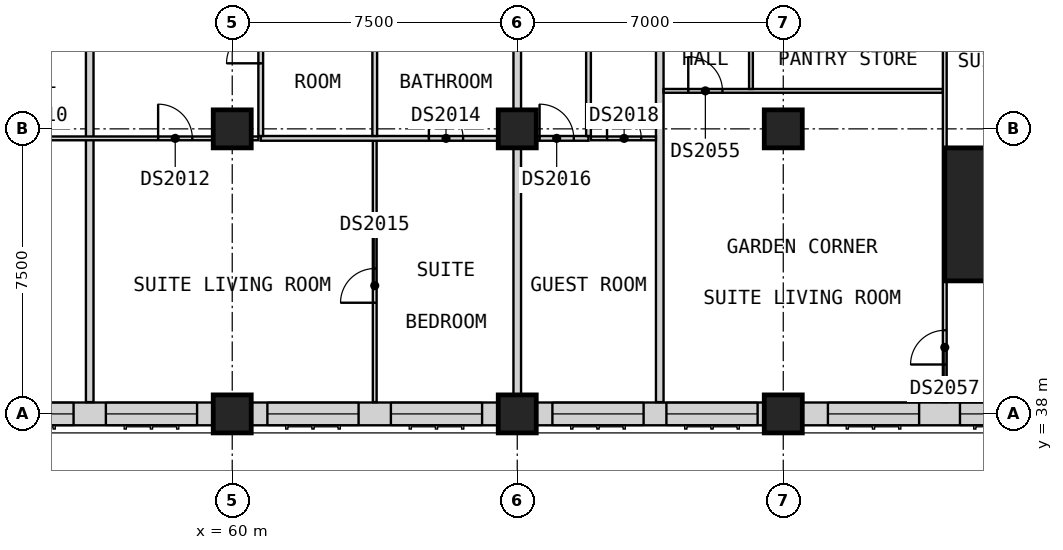
"""IFC4 building model, lengths in metres.
Left out: names, types, materials, properties, quantities, classifications, styles, units other than length and angle.
Written with IfcOpenShell. Run it as: python <this file> out.ifc"""

import sys

from ifc_helpers import new_model, si_unit, direction, frame, frame_2d, origin, origin_2d, place, context, subcontext, project, spatial, rectangle, extrude, element, fill, save


model = new_model("IFC4")
c1 = context("Model", 3, precision=1e-05, world=origin(), true_north=direction((0.0, 1.0)))
c2 = subcontext(c1, "Body", "Model", "MODEL_VIEW")
j1 = project(units=[si_unit("LENGTHUNIT", "METRE"), si_unit("PLANEANGLEUNIT", "RADIAN")], contexts=[c1])
p1 = place(None, origin())
s1 = spatial("IfcSite", under=j1, at=p1, CompositionType="ELEMENT")
p2 = place(p1, origin())
s2 = spatial("IfcBuilding", under=s1, at=p2, CompositionType="ELEMENT")
p3 = place(p2, frame((0.0, 0.0, 133.8)))
s3 = spatial("IfcBuildingStorey", under=s2, at=p3, CompositionType="ELEMENT", Elevation=133.8)
for number, where, z_axis, x_axis in (
    (1, (60.0, 38.0, 0.0), (0.0, 0.0, 1.0), (1.0, 0.0, 0.0)),
    (2, (60.0, 45.5, 0.0), (0.0, 0.0, 1.0), (1.0, 0.0, 0.0)),
    (3, (67.5, 38.0, 0.0), (0.0, 0.0, 1.0), (1.0, 0.0, 0.0)),
    (4, (67.5, 45.5, 0.0), (0.0, 0.0, 1.0), (1.0, 0.0, 0.0)),
    (5, (74.5, 38.0, 0.0), (0.0, 0.0, 1.0), (1.0, 0.0, 0.0)),
    (6, (74.5, 45.5, 0.0), (0.0, 0.0, 1.0), (1.0, 0.0, 0.0)),
):
    element("IfcColumn", number, at=place(p3, frame(where, z_axis=z_axis, x_axis=x_axis)), inside=s3, PredefinedType="COLUMN", context=c2, shape_type="SweptSolid", body=[
        extrude(rectangle(XDim=1.0, YDim=1.0, at=origin_2d()), origin(), (0.0, 0.0, 1.0), 3.6),
    ])
p4 = place(p3, frame((80.5, 43.25, 0.0), z_axis=(0.0, 0.0, 1.0), x_axis=(1.0, 0.0, 0.0)))
e7 = element("IfcColumn", 7, at=p4, inside=s3, PredefinedType="COLUMN", context=c2, shape_type="SweptSolid", body=[
    extrude(rectangle(XDim=3.5, YDim=3.5, at=origin_2d()), origin(), (0.0, 0.0, 1.0), 3.6),
])
p5 = place(p3, frame((53.0, 38.0, 0.0), z_axis=(0.0, 0.0, 1.0), x_axis=(1.0, 0.0, 0.0)))
e8 = element("IfcWall", 8, at=p5, inside=s3, PredefinedType="SOLIDWALL", context=c2, shape_type="SweptSolid", body=[
    extrude(rectangle(XDim=6.5, YDim=0.6, at=frame_2d((3.25, 0.0))), origin(), (0.0, 0.0, 1.0), 2.85),
])
p6 = place(p5, frame((0.425, 0.0, 0.8)))
e9 = element("IfcOpeningElement", 9, at=p6, cuts=e8, PredefinedType="OPENING", context=c2, shape_type="SweptSolid", body=[
    extrude(rectangle(XDim=2.4, YDim=1.8, at=frame_2d((1.2, 0.9))), frame((0.0, 0.31, 0.0), z_axis=(0.0, -1.0, 0.0), x_axis=(1.0, 0.0, 0.0)), (0.0, 0.0, 1.0), 0.62),
])
p7 = place(p5, frame((3.675, 0.0, 0.8)))
e10 = element("IfcOpeningElement", 10, at=p7, cuts=e8, PredefinedType="OPENING", context=c2, shape_type="SweptSolid", body=[
    extrude(rectangle(XDim=2.4, YDim=1.8, at=frame_2d((1.2, 0.9))), frame((0.0, 0.31, 0.0), z_axis=(0.0, -1.0, 0.0), x_axis=(1.0, 0.0, 0.0)), (0.0, 0.0, 1.0), 0.62),
])
p8 = place(p3, frame((60.5, 38.0, 0.0), z_axis=(0.0, 0.0, 1.0), x_axis=(1.0, 0.0, 0.0)))
e11 = element("IfcWall", 11, at=p8, inside=s3, PredefinedType="SOLIDWALL", context=c2, shape_type="SweptSolid", body=[
    extrude(rectangle(XDim=6.5, YDim=0.6, at=frame_2d((3.25, 0.0))), origin(), (0.0, 0.0, 1.0), 2.85),
])
p9 = place(p8, frame((0.425, 0.0, 0.8)))
e12 = element("IfcOpeningElement", 12, at=p9, cuts=e11, PredefinedType="OPENING", context=c2, shape_type="SweptSolid", body=[
    extrude(rectangle(XDim=2.4, YDim=1.8, at=frame_2d((1.2, 0.9))), frame((0.0, 0.31, 0.0), z_axis=(0.0, -1.0, 0.0), x_axis=(1.0, 0.0, 0.0)), (0.0, 0.0, 1.0), 0.62),
])
p10 = place(p8, frame((3.675, 0.0, 0.8)))
e13 = element("IfcOpeningElement", 13, at=p10, cuts=e11, PredefinedType="OPENING", context=c2, shape_type="SweptSolid", body=[
    extrude(rectangle(XDim=2.4, YDim=1.8, at=frame_2d((1.2, 0.9))), frame((0.0, 0.31, 0.0), z_axis=(0.0, -1.0, 0.0), x_axis=(1.0, 0.0, 0.0)), (0.0, 0.0, 1.0), 0.62),
])
p11 = place(p3, frame((68.0, 38.0, 0.0), z_axis=(0.0, 0.0, 1.0), x_axis=(1.0, 0.0, 0.0)))
e14 = element("IfcWall", 14, at=p11, inside=s3, PredefinedType="SOLIDWALL", context=c2, shape_type="SweptSolid", body=[
    extrude(rectangle(XDim=6.0, YDim=0.6, at=frame_2d((3.0, 0.0))), origin(), (0.0, 0.0, 1.0), 2.85),
])
p12 = place(p11, frame((0.425, 0.0, 0.8)))
e15 = element("IfcOpeningElement", 15, at=p12, cuts=e14, PredefinedType="OPENING", context=c2, shape_type="SweptSolid", body=[
    extrude(rectangle(XDim=2.4, YDim=1.8, at=frame_2d((1.2, 0.9))), frame((0.0, 0.31, 0.0), z_axis=(0.0, -1.0, 0.0), x_axis=(1.0, 0.0, 0.0)), (0.0, 0.0, 1.0), 0.62),
])
p13 = place(p11, frame((3.425, 0.0, 0.8)))
e16 = element("IfcOpeningElement", 16, at=p13, cuts=e14, PredefinedType="OPENING", context=c2, shape_type="SweptSolid", body=[
    extrude(rectangle(XDim=2.4, YDim=1.8, at=frame_2d((1.2, 0.9))), frame((0.0, 0.31, 0.0), z_axis=(0.0, -1.0, 0.0), x_axis=(1.0, 0.0, 0.0)), (0.0, 0.0, 1.0), 0.62),
])
p14 = place(p3, frame((75.0, 38.0, 0.0), z_axis=(0.0, 0.0, 1.0), x_axis=(1.0, 0.0, 0.0)))
e17 = element("IfcWall", 17, at=p14, inside=s3, PredefinedType="SOLIDWALL", context=c2, shape_type="SweptSolid", body=[
    extrude(rectangle(XDim=7.25, YDim=0.6, at=frame_2d((3.625, 0.0))), origin(), (0.0, 0.0, 1.0), 2.85),
])
p15 = place(p14, frame((0.675, 0.0, 0.8)))
e18 = element("IfcOpeningElement", 18, at=p15, cuts=e17, PredefinedType="OPENING", context=c2, shape_type="SweptSolid", body=[
    extrude(rectangle(XDim=2.4, YDim=1.8, at=frame_2d((1.2, 0.9))), frame((0.0, 0.31, 0.0), z_axis=(0.0, -1.0, 0.0), x_axis=(1.0, 0.0, 0.0)), (0.0, 0.0, 1.0), 0.62),
])
p16 = place(p14, frame((4.15, 0.0, 0.8)))
e19 = element("IfcOpeningElement", 19, at=p16, cuts=e17, PredefinedType="OPENING", context=c2, shape_type="SweptSolid", body=[
    extrude(rectangle(XDim=1.8, YDim=1.8, at=frame_2d((0.9, 0.9))), frame((0.0, 0.31, 0.0), z_axis=(0.0, -1.0, 0.0), x_axis=(1.0, 0.0, 0.0)), (0.0, 0.0, 1.0), 0.62),
])
p17 = place(p3, frame((56.25, 38.31, 0.0), z_axis=(0.0, 0.0, 1.0), x_axis=(0.0, 1.0, 0.0)))
e20 = element("IfcWall", 20, at=p17, inside=s3, PredefinedType="PARTITIONING", context=c2, shape_type="SweptSolid", body=[
    extrude(rectangle(XDim=11.715, YDim=0.2, at=frame_2d((5.857, 0.0))), origin(), (0.0, 0.0, 1.0), 3.35),
])
p18 = place(p3, frame((67.5, 37.5, 0.0), z_axis=(0.0, 0.0, 1.0), x_axis=(0.0, 1.0, 0.0)))
e21 = element("IfcWall", 21, at=p18, inside=s3, PredefinedType="PARTITIONING", context=c2, shape_type="SweptSolid", body=[
    extrude(rectangle(XDim=12.525, YDim=0.2, at=frame_2d((6.262, 0.0))), origin(), (0.0, 0.0, 1.0), 3.35),
])
p19 = place(p3, frame((71.25, 38.31, 0.0), z_axis=(0.0, 0.0, 1.0), x_axis=(0.0, 1.0, 0.0)))
e22 = element("IfcWall", 22, at=p19, inside=s3, PredefinedType="PARTITIONING", context=c2, shape_type="SweptSolid", body=[
    extrude(rectangle(XDim=11.715, YDim=0.2, at=frame_2d((5.857, 0.0))), origin(), (0.0, 0.0, 1.0), 3.35),
])
p20 = place(p3, frame((78.8, 42.0, 0.0), z_axis=(0.0, 0.0, 1.0), x_axis=(1.0, 0.0, 0.0)))
e23 = element("IfcWall", 23, at=p20, inside=s3, PredefinedType="PARTITIONING", context=c2, shape_type="SweptSolid", body=[
    extrude(rectangle(XDim=3.44, YDim=0.1, at=frame_2d((1.72, 0.0))), origin(), (0.0, 0.0, 1.0), 3.35),
])
p21 = place(p3, frame((53.312, 45.25, 0.0), z_axis=(0.0, 0.0, 1.0), x_axis=(1.0, 0.0, 0.0)))
e24 = element("IfcWall", 24, at=p21, inside=s3, PredefinedType="PARTITIONING", context=c2, shape_type="SweptSolid", body=[
    extrude(rectangle(XDim=7.375, YDim=0.1, at=frame_2d((3.688, 0.0))), origin(), (0.0, 0.0, 1.0), 3.35),
])
p22 = place(p21, frame((0.988, 0.0, 0.0)))
e25 = element("IfcOpeningElement", 25, at=p22, cuts=e24, PredefinedType="OPENING", context=c2, shape_type="SweptSolid", body=[
    extrude(rectangle(XDim=0.9, YDim=2.1, at=frame_2d((0.45, 1.05))), frame((0.0, 0.06, 0.0), z_axis=(0.0, -1.0, 0.0), x_axis=(1.0, 0.0, 0.0)), (0.0, 0.0, 1.0), 0.12),
])
p23 = place(p21, frame((4.738, 0.0, 0.0)))
e26 = element("IfcOpeningElement", 26, at=p23, cuts=e24, PredefinedType="OPENING", context=c2, shape_type="SweptSolid", body=[
    extrude(rectangle(XDim=0.9, YDim=2.1, at=frame_2d((0.45, 1.05))), frame((0.0, 0.06, 0.0), z_axis=(0.0, -1.0, 0.0), x_axis=(1.0, 0.0, 0.0)), (0.0, 0.0, 1.0), 0.12),
])
p24 = place(p3, frame((69.438, 45.25, 0.0), z_axis=(0.0, 0.0, 1.0), x_axis=(1.0, 0.0, 0.0)))
e27 = element("IfcWall", 27, at=p24, inside=s3, PredefinedType="PARTITIONING", context=c2, shape_type="SweptSolid", body=[
    extrude(rectangle(XDim=1.712, YDim=0.1, at=frame_2d((0.856, 0.0))), origin(), (0.0, 0.0, 1.0), 3.35),
])
p25 = place(p24, frame((0.425, 0.0, 0.0)))
e28 = element("IfcOpeningElement", 28, at=p25, cuts=e27, PredefinedType="OPENING", context=c2, shape_type="SweptSolid", body=[
    extrude(rectangle(XDim=0.9, YDim=2.1, at=frame_2d((0.45, 1.05))), frame((0.0, 0.06, 0.0), z_axis=(0.0, -1.0, 0.0), x_axis=(1.0, 0.0, 0.0)), (0.0, 0.0, 1.0), 0.12),
])
p26 = place(p3, frame((71.35, 46.5, 0.0), z_axis=(0.0, 0.0, 1.0), x_axis=(1.0, 0.0, 0.0)))
e29 = element("IfcWall", 29, at=p26, inside=s3, PredefinedType="PARTITIONING", context=c2, shape_type="SweptSolid", body=[
    extrude(rectangle(XDim=7.35, YDim=0.1, at=frame_2d((3.675, 0.0))), origin(), (0.0, 0.0, 1.0), 3.35),
])
p27 = place(p26, frame((0.65, 0.0, 0.0)))
e30 = element("IfcOpeningElement", 30, at=p27, cuts=e29, PredefinedType="OPENING", context=c2, shape_type="SweptSolid", body=[
    extrude(rectangle(XDim=0.9, YDim=2.1, at=frame_2d((0.45, 1.05))), frame((0.0, 0.06, 0.0), z_axis=(0.0, -1.0, 0.0), x_axis=(1.0, 0.0, 0.0)), (0.0, 0.0, 1.0), 0.12),
])
p28 = place(p3, frame((63.75, 38.31, 0.0), z_axis=(0.0, 0.0, 1.0), x_axis=(0.0, 1.0, 0.0)))
e31 = element("IfcWall", 31, at=p28, inside=s3, PredefinedType="PARTITIONING", context=c2, shape_type="SweptSolid", body=[
    extrude(rectangle(XDim=6.877, YDim=0.1, at=frame_2d((3.439, 0.0))), origin(), (0.0, 0.0, 1.0), 3.35),
])
p29 = place(p28, frame((2.615, 0.0, 0.0)))
e32 = element("IfcOpeningElement", 32, at=p29, cuts=e31, PredefinedType="OPENING", context=c2, shape_type="SweptSolid", body=[
    extrude(rectangle(XDim=0.9, YDim=2.1, at=frame_2d((0.45, 1.05))), frame((0.0, 0.06, 0.0), z_axis=(0.0, -1.0, 0.0), x_axis=(1.0, 0.0, 0.0)), (0.0, 0.0, 1.0), 0.12),
])
p30 = place(p3, frame((73.65, 46.55, 0.0), z_axis=(0.0, 0.0, 1.0), x_axis=(0.0, 1.0, 0.0)))
e33 = element("IfcWall", 33, at=p30, inside=s3, PredefinedType="PARTITIONING", context=c2, shape_type="SweptSolid", body=[
    extrude(rectangle(XDim=3.475, YDim=0.1, at=frame_2d((1.737, 0.0))), origin(), (0.0, 0.0, 1.0), 3.35),
])
p31 = place(p30, frame((1.3, 0.0, 0.0)))
e34 = element("IfcOpeningElement", 34, at=p31, cuts=e33, PredefinedType="OPENING", context=c2, shape_type="SweptSolid", body=[
    extrude(rectangle(XDim=0.9, YDim=2.1, at=frame_2d((0.45, 1.05))), frame((0.0, 0.06, 0.0), z_axis=(0.0, -1.0, 0.0), x_axis=(1.0, 0.0, 0.0)), (0.0, 0.0, 1.0), 0.12),
])
p32 = place(p3, frame((78.75, 38.31, 0.0), z_axis=(0.0, 0.0, 1.0), x_axis=(0.0, 1.0, 0.0)))
e35 = element("IfcWall", 35, at=p32, inside=s3, PredefinedType="PARTITIONING", context=c2, shape_type="SweptSolid", body=[
    extrude(rectangle(XDim=11.728, YDim=0.1, at=frame_2d((5.864, 0.0))), origin(), (0.0, 0.0, 1.0), 3.35),
])
p33 = place(p32, frame((0.99, 0.0, 0.0)))
e36 = element("IfcOpeningElement", 36, at=p33, cuts=e35, PredefinedType="OPENING", context=c2, shape_type="SweptSolid", body=[
    extrude(rectangle(XDim=0.9, YDim=2.1, at=frame_2d((0.45, 1.05))), frame((0.0, 0.06, 0.0), z_axis=(0.0, -1.0, 0.0), x_axis=(1.0, 0.0, 0.0)), (0.0, 0.0, 1.0), 0.12),
])
p34 = place(p32, frame((9.54, 0.0, 0.0)))
e37 = element("IfcOpeningElement", 37, at=p34, cuts=e35, PredefinedType="OPENING", context=c2, shape_type="SweptSolid", body=[
    extrude(rectangle(XDim=0.9, YDim=2.1, at=frame_2d((0.45, 1.05))), frame((0.0, 0.06, 0.0), z_axis=(0.0, -1.0, 0.0), x_axis=(1.0, 0.0, 0.0)), (0.0, 0.0, 1.0), 0.12),
])
p35 = place(p3, frame((60.75, 45.25, 0.0), z_axis=(0.0, 0.0, 1.0), x_axis=(1.0, 0.0, 0.0)))
e38 = element("IfcWall", 38, at=p35, inside=s3, PredefinedType="PARTITIONING", context=c2, shape_type="SweptSolid", body=[
    extrude(rectangle(XDim=8.625, YDim=0.125, at=frame_2d((4.312, 0.0))), origin(), (0.0, 0.0, 1.0), 3.35),
])
p36 = place(p35, frame((4.425, 0.0, 0.0)))
e39 = element("IfcOpeningElement", 39, at=p36, cuts=e38, PredefinedType="OPENING", context=c2, shape_type="SweptSolid", body=[
    extrude(rectangle(XDim=0.9, YDim=2.1, at=frame_2d((0.45, 1.05))), frame((0.0, 0.073, 0.0), z_axis=(0.0, -1.0, 0.0), x_axis=(1.0, 0.0, 0.0)), (0.0, 0.0, 1.0), 0.145),
])
p37 = place(p35, frame((7.337, 0.0, 0.0)))
e40 = element("IfcOpeningElement", 40, at=p37, cuts=e38, PredefinedType="OPENING", context=c2, shape_type="SweptSolid", body=[
    extrude(rectangle(XDim=0.9, YDim=2.1, at=frame_2d((0.45, 1.05))), frame((0.0, 0.073, 0.0), z_axis=(0.0, -1.0, 0.0), x_axis=(1.0, 0.0, 0.0)), (0.0, 0.0, 1.0), 0.145),
])
p38 = place(p3, frame((60.75, 45.312, 0.0), z_axis=(0.0, 0.0, 1.0), x_axis=(0.0, 1.0, 0.0)))
e41 = element("IfcWall", 41, at=p38, inside=s3, PredefinedType="PARTITIONING", context=c2, shape_type="SweptSolid", body=[
    extrude(rectangle(XDim=4.712, YDim=0.125, at=frame_2d((2.356, 0.0))), origin(), (0.0, 0.0, 1.0), 3.35),
])
p39 = place(p38, frame((1.913, 0.0, 0.0)))
e42 = element("IfcOpeningElement", 42, at=p39, cuts=e41, PredefinedType="OPENING", context=c2, shape_type="SweptSolid", body=[
    extrude(rectangle(XDim=0.9, YDim=2.1, at=frame_2d((0.45, 1.05))), frame((0.0, 0.073, 0.0), z_axis=(0.0, -1.0, 0.0), x_axis=(1.0, 0.0, 0.0)), (0.0, 0.0, 1.0), 0.145),
])
for number, where, z_axis, x_axis in (
    (43, (63.75, 45.312, 0.0), (0.0, 0.0, 1.0), (0.0, 1.0, 0.0)),
    (44, (69.375, 45.312, 0.0), (0.0, 0.0, 1.0), (0.0, 1.0, 0.0)),
):
    element("IfcWall", number, at=place(p3, frame(where, z_axis=z_axis, x_axis=x_axis)), inside=s3, PredefinedType="PARTITIONING", context=c2, shape_type="SweptSolid", body=[
        extrude(rectangle(XDim=4.712, YDim=0.125, at=frame_2d((2.356, 0.0))), origin(), (0.0, 0.0, 1.0), 3.35),
    ])
p40 = place(p6, origin())
e45 = element("IfcWindow", 45, at=p40, inside=s3, PartitioningType="SINGLE_PANEL", PredefinedType="WINDOW", context=c2, shape_type="SweptSolid", body=[
    extrude(rectangle(XDim=2.4, YDim=1.8, at=frame_2d((1.2, 0.9))), frame((0.0, -0.07, 0.0), z_axis=(0.0, -1.0, 0.0), x_axis=(1.0, 0.0, 0.0)), (0.0, 0.0, 1.0), 0.06),
])
fill(e9, e45)
p41 = place(p7, origin())
e46 = element("IfcWindow", 46, at=p41, inside=s3, PartitioningType="SINGLE_PANEL", PredefinedType="WINDOW", context=c2, shape_type="SweptSolid", body=[
    extrude(rectangle(XDim=2.4, YDim=1.8, at=frame_2d((1.2, 0.9))), frame((0.0, -0.07, 0.0), z_axis=(0.0, -1.0, 0.0), x_axis=(1.0, 0.0, 0.0)), (0.0, 0.0, 1.0), 0.06),
])
fill(e10, e46)
p42 = place(p9, origin())
e47 = element("IfcWindow", 47, at=p42, inside=s3, PartitioningType="SINGLE_PANEL", PredefinedType="WINDOW", context=c2, shape_type="SweptSolid", body=[
    extrude(rectangle(XDim=2.4, YDim=1.8, at=frame_2d((1.2, 0.9))), frame((0.0, -0.07, 0.0), z_axis=(0.0, -1.0, 0.0), x_axis=(1.0, 0.0, 0.0)), (0.0, 0.0, 1.0), 0.06),
])
fill(e12, e47)
p43 = place(p10, origin())
e48 = element("IfcWindow", 48, at=p43, inside=s3, PartitioningType="SINGLE_PANEL", PredefinedType="WINDOW", context=c2, shape_type="SweptSolid", body=[
    extrude(rectangle(XDim=2.4, YDim=1.8, at=frame_2d((1.2, 0.9))), frame((0.0, -0.07, 0.0), z_axis=(0.0, -1.0, 0.0), x_axis=(1.0, 0.0, 0.0)), (0.0, 0.0, 1.0), 0.06),
])
fill(e13, e48)
p44 = place(p12, origin())
e49 = element("IfcWindow", 49, at=p44, inside=s3, PartitioningType="SINGLE_PANEL", PredefinedType="WINDOW", context=c2, shape_type="SweptSolid", body=[
    extrude(rectangle(XDim=2.4, YDim=1.8, at=frame_2d((1.2, 0.9))), frame((0.0, -0.07, 0.0), z_axis=(0.0, -1.0, 0.0), x_axis=(1.0, 0.0, 0.0)), (0.0, 0.0, 1.0), 0.06),
])
fill(e15, e49)
p45 = place(p13, origin())
e50 = element("IfcWindow", 50, at=p45, inside=s3, PartitioningType="SINGLE_PANEL", PredefinedType="WINDOW", context=c2, shape_type="SweptSolid", body=[
    extrude(rectangle(XDim=2.4, YDim=1.8, at=frame_2d((1.2, 0.9))), frame((0.0, -0.07, 0.0), z_axis=(0.0, -1.0, 0.0), x_axis=(1.0, 0.0, 0.0)), (0.0, 0.0, 1.0), 0.06),
])
fill(e16, e50)
p46 = place(p15, origin())
e51 = element("IfcWindow", 51, at=p46, inside=s3, PartitioningType="SINGLE_PANEL", PredefinedType="WINDOW", context=c2, shape_type="SweptSolid", body=[
    extrude(rectangle(XDim=2.4, YDim=1.8, at=frame_2d((1.2, 0.9))), frame((0.0, -0.07, 0.0), z_axis=(0.0, -1.0, 0.0), x_axis=(1.0, 0.0, 0.0)), (0.0, 0.0, 1.0), 0.06),
])
fill(e18, e51)
p47 = place(p16, origin())
e52 = element("IfcWindow", 52, at=p47, inside=s3, PartitioningType="SINGLE_PANEL", PredefinedType="WINDOW", context=c2, shape_type="SweptSolid", body=[
    extrude(rectangle(XDim=1.8, YDim=1.8, at=frame_2d((0.9, 0.9))), frame((0.0, -0.07, 0.0), z_axis=(0.0, -1.0, 0.0), x_axis=(1.0, 0.0, 0.0)), (0.0, 0.0, 1.0), 0.06),
])
fill(e19, e52)
p48 = place(p23, origin())
e53 = element("IfcDoor", 53, at=p48, inside=s3, OperationType="SINGLE_SWING_LEFT", PredefinedType="DOOR", context=c2, shape_type="SweptSolid", body=[
    extrude(rectangle(XDim=0.9, YDim=2.1, at=frame_2d((0.45, 1.05))), frame((0.0, 0.025, 0.0), z_axis=(0.0, -1.0, 0.0), x_axis=(1.0, 0.0, 0.0)), (0.0, 0.0, 1.0), 0.05),
])
fill(e26, e53)
p49 = place(p39, origin())
e54 = element("IfcDoor", 54, at=p49, inside=s3, OperationType="SINGLE_SWING_LEFT", PredefinedType="DOOR", context=c2, shape_type="SweptSolid", body=[
    extrude(rectangle(XDim=0.9, YDim=2.1, at=frame_2d((0.45, 1.05))), frame((0.0, 0.025, 0.0), z_axis=(0.0, -1.0, 0.0), x_axis=(1.0, 0.0, 0.0)), (0.0, 0.0, 1.0), 0.05),
])
fill(e42, e54)
p50 = place(p36, origin())
e55 = element("IfcDoor", 55, at=p50, inside=s3, OperationType="SINGLE_SWING_LEFT", PredefinedType="DOOR", context=c2, shape_type="SweptSolid", body=[
    extrude(rectangle(XDim=0.9, YDim=2.1, at=frame_2d((0.45, 1.05))), frame((0.0, 0.025, 0.0), z_axis=(0.0, -1.0, 0.0), x_axis=(1.0, 0.0, 0.0)), (0.0, 0.0, 1.0), 0.05),
])
fill(e39, e55)
p51 = place(p29, origin())
e56 = element("IfcDoor", 56, at=p51, inside=s3, OperationType="SINGLE_SWING_LEFT", PredefinedType="DOOR", context=c2, shape_type="SweptSolid", body=[
    extrude(rectangle(XDim=0.9, YDim=2.1, at=frame_2d((0.45, 1.05))), frame((0.0, 0.025, 0.0), z_axis=(0.0, -1.0, 0.0), x_axis=(1.0, 0.0, 0.0)), (0.0, 0.0, 1.0), 0.05),
])
fill(e32, e56)
p52 = place(p37, origin())
e57 = element("IfcDoor", 57, at=p52, inside=s3, OperationType="SINGLE_SWING_RIGHT", PredefinedType="DOOR", context=c2, shape_type="SweptSolid", body=[
    extrude(rectangle(XDim=0.9, YDim=2.1, at=frame_2d((0.45, 1.05))), frame((0.0, 0.025, 0.0), z_axis=(0.0, -1.0, 0.0), x_axis=(1.0, 0.0, 0.0)), (0.0, 0.0, 1.0), 0.05),
])
fill(e40, e57)
p53 = place(p25, origin())
e58 = element("IfcDoor", 58, at=p53, inside=s3, OperationType="SINGLE_SWING_LEFT", PredefinedType="DOOR", context=c2, shape_type="SweptSolid", body=[
    extrude(rectangle(XDim=0.9, YDim=2.1, at=frame_2d((0.45, 1.05))), frame((0.0, 0.025, 0.0), z_axis=(0.0, -1.0, 0.0), x_axis=(1.0, 0.0, 0.0)), (0.0, 0.0, 1.0), 0.05),
])
fill(e28, e58)
p54 = place(p27, origin())
e59 = element("IfcDoor", 59, at=p54, inside=s3, OperationType="SINGLE_SWING_RIGHT", PredefinedType="DOOR", context=c2, shape_type="SweptSolid", body=[
    extrude(rectangle(XDim=0.9, YDim=2.1, at=frame_2d((0.45, 1.05))), frame((0.0, 0.025, 0.0), z_axis=(0.0, -1.0, 0.0), x_axis=(1.0, 0.0, 0.0)), (0.0, 0.0, 1.0), 0.05),
])
fill(e30, e59)
p55 = place(p33, origin())
e60 = element("IfcDoor", 60, at=p55, inside=s3, OperationType="SINGLE_SWING_LEFT", PredefinedType="DOOR", context=c2, shape_type="SweptSolid", body=[
    extrude(rectangle(XDim=0.9, YDim=2.1, at=frame_2d((0.45, 1.05))), frame((0.0, 0.025, 0.0), z_axis=(0.0, -1.0, 0.0), x_axis=(1.0, 0.0, 0.0)), (0.0, 0.0, 1.0), 0.05),
])
fill(e36, e60)
save(model, sys.argv[1])
